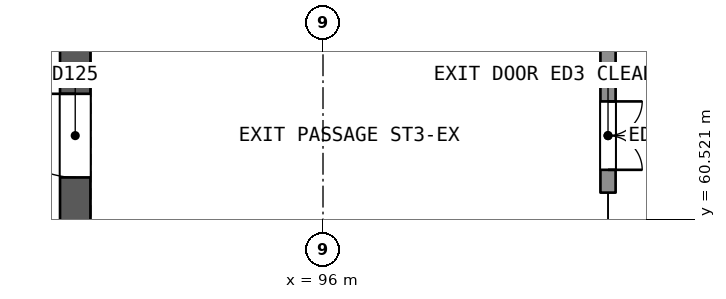
"""IFC4 building model, lengths in metres.
Left out: names, types, materials, properties, quantities, classifications, styles, units other than length and angle.
Written with IfcOpenShell. Run it as: python <this file> out.ifc"""

import sys

from ifc_helpers import new_model, si_unit, direction, frame, frame_2d, origin, place, context, subcontext, project, spatial, rectangle, extrude, element, fill, save


model = new_model("IFC4")
c1 = context("Model", 3, precision=1e-05, world=origin(), true_north=direction((0.0, 1.0)))
c2 = subcontext(c1, "Body", "Model", "MODEL_VIEW")
j1 = project(units=[si_unit("LENGTHUNIT", "METRE"), si_unit("PLANEANGLEUNIT", "RADIAN")], contexts=[c1])
p1 = place(None, origin())
s1 = spatial("IfcSite", under=j1, at=p1, CompositionType="ELEMENT")
p2 = place(p1, origin())
s2 = spatial("IfcBuilding", under=s1, at=p2, CompositionType="ELEMENT")
p3 = place(p2, origin())
s3 = spatial("IfcBuildingStorey", under=s2, at=p3, CompositionType="ELEMENT", Elevation=0.0)
p4 = place(p3, frame((89.48, 58.103, 0.0), z_axis=(0.0, 0.0, 1.0), x_axis=(0.0, 1.0, 0.0)))
e1 = element("IfcWall", 1, at=p4, inside=s3, PredefinedType="SHEAR", context=c2, shape_type="SweptSolid", body=[
    extrude(rectangle(XDim=14.103, YDim=0.8, at=frame_2d((7.051, 0.0))), origin(), (0.0, 0.0, 1.0), 9.0),
])
p5 = place(p4, frame((3.522, 0.0, 0.0)))
e2 = element("IfcOpeningElement", 2, at=p5, cuts=e1, PredefinedType="OPENING", context=c2, shape_type="SweptSolid", body=[
    extrude(rectangle(XDim=2.2, YDim=2.1, at=frame_2d((1.1, 1.05))), frame((0.0, 0.411, 0.0), z_axis=(0.0, -1.0, 0.0), x_axis=(1.0, 0.0, 0.0)), (0.0, 0.0, 1.0), 0.821),
])
p6 = place(p3, frame((103.5, 72.552, 0.0), z_axis=(0.0, 0.0, 1.0), x_axis=(0.0, -1.0, 0.0)))
e3 = element("IfcWall", 3, at=p6, inside=s3, PredefinedType="SOLIDWALL", context=c2, shape_type="SweptSolid", body=[
    extrude(rectangle(XDim=11.327, YDim=0.4, at=frame_2d((5.664, 0.0))), origin(), (0.0, 0.0, 1.0), 8.6),
])
p7 = place(p6, frame((8.927, 0.0, 0.0)))
e4 = element("IfcOpeningElement", 4, at=p7, cuts=e3, PredefinedType="OPENING", context=c2, shape_type="SweptSolid", body=[
    extrude(rectangle(XDim=1.8, YDim=2.4, at=frame_2d((0.9, 1.2))), frame((0.0, 0.21, 0.0), z_axis=(0.0, -1.0, 0.0), x_axis=(1.0, 0.0, 0.0)), (0.0, 0.0, 1.0), 0.421),
])
p8 = place(p6, frame((0.6, 0.0, 0.0)))
e5 = element("IfcOpeningElement", 5, at=p8, cuts=e3, PredefinedType="OPENING", context=c2, shape_type="SweptSolid", body=[
    extrude(rectangle(XDim=1.4, YDim=2.4, at=frame_2d((0.7, 1.2))), frame((0.0, 0.21, 0.0), z_axis=(0.0, -1.0, 0.0), x_axis=(1.0, 0.0, 0.0)), (0.0, 0.0, 1.0), 0.421),
])
p9 = place(p3, frame((85.087, 66.679, 0.0), z_axis=(0.0, 0.0, 1.0), x_axis=(0.500019787375, -0.866013979237, 0.0)))
e6 = element("IfcWall", 6, at=p9, inside=s3, PredefinedType="SOLIDWALL", context=c2, shape_type="SweptSolid", body=[
    extrude(rectangle(XDim=7.7, YDim=0.2, at=frame_2d((3.85, 0.0))), origin(), (0.0, 0.0, 1.0), 8.6),
])
p10 = place(p9, frame((0.55, 0.0, 0.0)))
e7 = element("IfcOpeningElement", 7, at=p10, cuts=e6, PredefinedType="OPENING", context=c2, shape_type="SweptSolid", body=[
    extrude(rectangle(XDim=1.1, YDim=2.1, at=frame_2d((0.55, 1.05))), frame((0.0, 0.11, 0.0), z_axis=(0.0, -1.0, 0.0), x_axis=(1.0, 0.0, 0.0)), (0.0, 0.0, 1.0), 0.221),
])
p11 = place(p7, origin())
e8 = element("IfcDoor", 8, at=p11, inside=s3, OperationType="DOUBLE_DOOR_SINGLE_SWING", PredefinedType="NOTDEFINED", context=c2, shape_type="SweptSolid", body=[
    extrude(rectangle(XDim=1.8, YDim=2.4, at=frame_2d((0.9, 1.2))), frame((0.0, 0.025, 0.0), z_axis=(0.0, -1.0, 0.0), x_axis=(1.0, 0.0, 0.0)), (0.0, 0.0, 1.0), 0.05),
])
fill(e4, e8)
p12 = place(p5, origin())
e9 = element("IfcDoor", 9, at=p12, inside=s3, OperationType="SINGLE_SWING_RIGHT", PredefinedType="NOTDEFINED", context=c2, shape_type="SweptSolid", body=[
    extrude(rectangle(XDim=2.2, YDim=2.1, at=frame_2d((1.1, 1.05))), frame((0.0, 0.025, 0.0), z_axis=(0.0, -1.0, 0.0), x_axis=(1.0, 0.0, 0.0)), (0.0, 0.0, 1.0), 0.05),
])
fill(e2, e9)
save(model, sys.argv[1])
